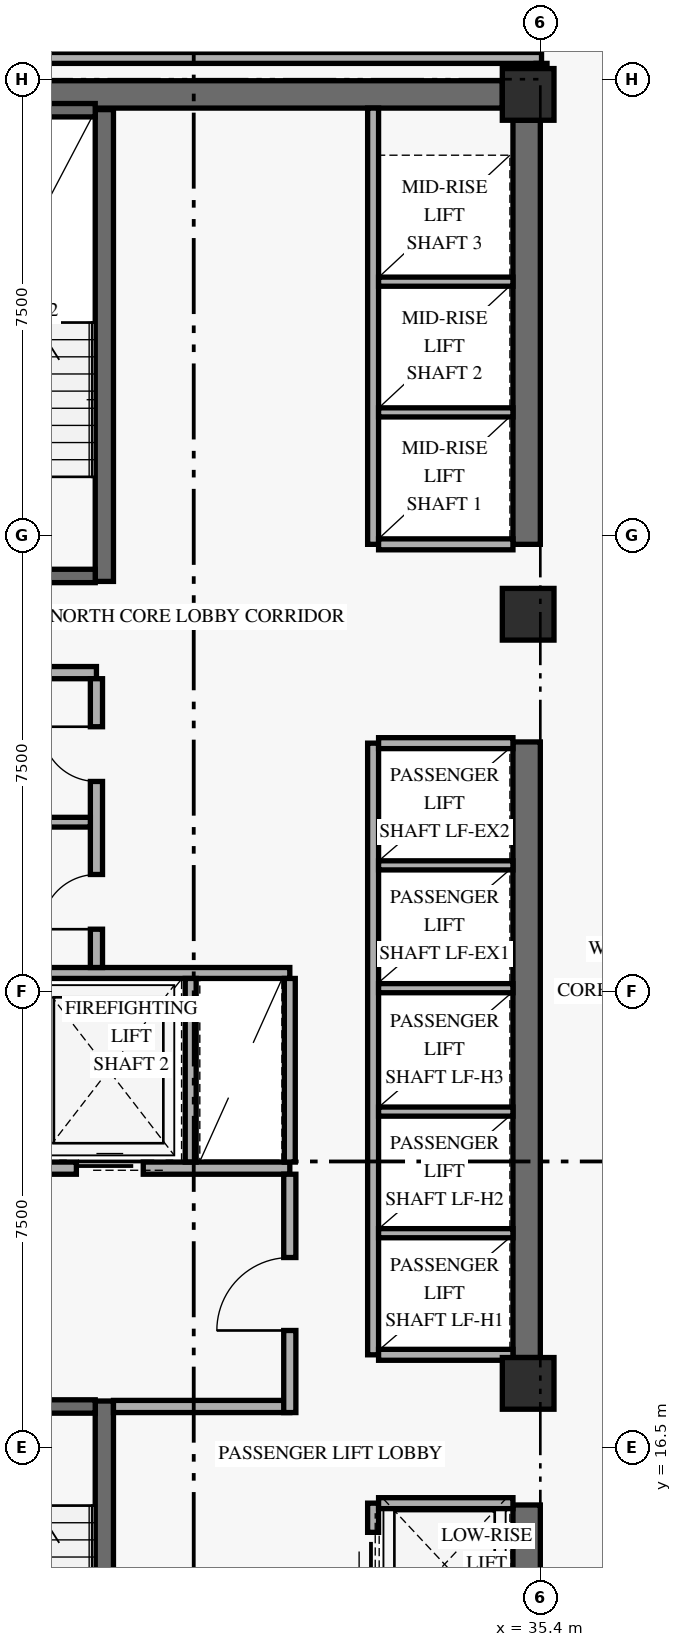
"""IFC4 building model, lengths in metres.
Left out: names, types, materials, properties, quantities, classifications, styles, units other than length and angle.
Written with IfcOpenShell. Run it as: python <this file> out.ifc"""

import sys

from ifc_helpers import new_model, si_unit, direction, frame, frame_2d, origin, origin_2d, place, context, subcontext, project, spatial, rectangle, extrude, element, fill, save


model = new_model("IFC4")
c1 = context("Model", 3, precision=1e-05, world=origin(), true_north=direction((0.0, 1.0)))
c2 = subcontext(c1, "Body", "Model", "MODEL_VIEW")
j1 = project(units=[si_unit("LENGTHUNIT", "METRE"), si_unit("PLANEANGLEUNIT", "RADIAN")], contexts=[c1])
p1 = place(None, origin())
s1 = spatial("IfcSite", under=j1, at=p1, CompositionType="ELEMENT")
p2 = place(p1, origin())
s2 = spatial("IfcBuilding", under=s1, at=p2, CompositionType="ELEMENT")
p3 = place(p2, frame((0.0, 0.0, 87.6)))
s3 = spatial("IfcBuildingStorey", under=s2, at=p3, CompositionType="ELEMENT", Elevation=87.6)
p4 = place(p3, frame((35.175, 9.675, 0.0), z_axis=(0.0, 0.0, 1.0), x_axis=(0.0, 1.0, 0.0)))
e1 = element("IfcWall", 1, at=p4, inside=s3, PredefinedType="SHEAR", context=c2, shape_type="SweptSolid", body=[
    extrude(rectangle(XDim=5.875, YDim=0.45, at=frame_2d((2.938, 0.0))), origin(), (0.0, 0.0, 1.0), 2.749),
])
p5 = place(p3, frame((35.175, 17.975, 0.0), z_axis=(0.0, 0.0, 1.0), x_axis=(0.0, 1.0, 0.0)))
e2 = element("IfcWall", 2, at=p5, inside=s3, PredefinedType="SHEAR", context=c2, shape_type="SweptSolid", body=[
    extrude(rectangle(XDim=10.125, YDim=0.45, at=frame_2d((5.062, 0.0))), origin(), (0.0, 0.0, 1.0), 2.749),
])
p6 = place(p3, frame((35.175, 31.35, 0.0), z_axis=(0.0, 0.0, 1.0), x_axis=(0.0, 1.0, 0.0)))
e3 = element("IfcWall", 3, at=p6, inside=s3, PredefinedType="SHEAR", context=c2, shape_type="SweptSolid", body=[
    extrude(rectangle(XDim=6.975, YDim=0.45, at=frame_2d((3.487, 0.0))), origin(), (0.0, 0.0, 1.0), 2.749),
])
p7 = place(p3, frame((24.625, 38.75, 0.0), z_axis=(0.0, 0.0, 1.0), x_axis=(1.0, 0.0, 0.0)))
e4 = element("IfcWall", 4, at=p7, inside=s3, PredefinedType="SHEAR", context=c2, shape_type="SweptSolid", body=[
    extrude(rectangle(XDim=10.15, YDim=0.45, at=frame_2d((5.075, 0.0))), origin(), (0.0, 0.0, 1.0), 3.36),
])
p8 = place(p3, frame((28.23, 9.5, 0.0), z_axis=(0.0, 0.0, 1.0), x_axis=(0.0, 1.0, 0.0)))
e5 = element("IfcWall", 5, at=p8, inside=s3, PredefinedType="SHEAR", context=c2, shape_type="SweptSolid", body=[
    extrude(rectangle(XDim=7.76, YDim=0.3, at=frame_2d((3.88, 0.0))), origin(), (0.0, 0.0, 1.0), 3.36),
])
p9 = place(p3, frame((24.92, 17.17, 0.0), z_axis=(0.0, 0.0, 1.0), x_axis=(1.0, 0.0, 0.0)))
e6 = element("IfcWall", 6, at=p9, inside=s3, PredefinedType="SHEAR", context=c2, shape_type="SweptSolid", body=[
    extrude(rectangle(XDim=3.16, YDim=0.22, at=frame_2d((1.58, 0.0))), origin(), (0.0, 0.0, 1.0), 3.36),
])
p10 = place(p9, frame((0.78, 0.0, 0.0)))
e7 = element("IfcOpeningElement", 7, at=p10, cuts=e6, PredefinedType="OPENING", context=c2, shape_type="SweptSolid", body=[
    extrude(rectangle(XDim=1.05, YDim=2.15, at=frame_2d((0.525, 1.075))), frame((0.0, 0.12, 0.0), z_axis=(0.0, -1.0, 0.0), x_axis=(1.0, 0.0, 0.0)), (0.0, 0.0, 1.0), 0.24),
])
p11 = place(p3, frame((28.23, 30.74, 0.0), z_axis=(0.0, 0.0, 1.0), x_axis=(0.0, 1.0, 0.0)))
e8 = element("IfcWall", 8, at=p11, inside=s3, PredefinedType="SHEAR", context=c2, shape_type="SweptSolid", body=[
    extrude(rectangle(XDim=7.76, YDim=0.3, at=frame_2d((3.88, 0.0))), origin(), (0.0, 0.0, 1.0), 3.36),
])
p12 = place(p3, frame((24.92, 30.83, 0.0), z_axis=(0.0, 0.0, 1.0), x_axis=(1.0, 0.0, 0.0)))
e9 = element("IfcWall", 9, at=p12, inside=s3, PredefinedType="SHEAR", context=c2, shape_type="SweptSolid", body=[
    extrude(rectangle(XDim=3.16, YDim=0.22, at=frame_2d((1.58, 0.0))), origin(), (0.0, 0.0, 1.0), 3.36),
])
p13 = place(p12, frame((0.78, 0.0, 0.0)))
e10 = element("IfcOpeningElement", 10, at=p13, cuts=e9, PredefinedType="OPENING", context=c2, shape_type="SweptSolid", body=[
    extrude(rectangle(XDim=1.05, YDim=2.15, at=frame_2d((0.525, 1.075))), frame((0.0, 0.12, 0.0), z_axis=(0.0, -1.0, 0.0), x_axis=(1.0, 0.0, 0.0)), (0.0, 0.0, 1.0), 0.24),
])
p14 = place(p3, frame((24.92, 38.49, 0.0), z_axis=(0.0, 0.0, 1.0), x_axis=(1.0, 0.0, 0.0)))
e11 = element("IfcWall", 11, at=p14, inside=s3, PredefinedType="SHEAR", context=c2, shape_type="SweptSolid", body=[
    extrude(rectangle(XDim=3.16, YDim=0.22, at=frame_2d((1.58, 0.0))), origin(), (0.0, 0.0, 1.0), 3.36),
])
for number, where, z_axis, x_axis in (
    (12, (35.2, 17.55, 0.0), (0.0, 0.0, 1.0), (1.0, 0.0, 0.0)),
    (13, (35.2, 30.2, 0.0), (0.0, 0.0, 1.0), (1.0, 0.0, 0.0)),
    (14, (35.2, 38.75, 0.0), (0.0, 0.0, 1.0), (1.0, 0.0, 0.0)),
):
    element("IfcColumn", number, at=place(p3, frame(where, z_axis=z_axis, x_axis=x_axis)), inside=s3, PredefinedType="COLUMN", context=c2, shape_type="SweptSolid", body=[
        extrude(rectangle(XDim=0.85, YDim=0.85, at=origin_2d()), origin(), (0.0, 0.0, 1.0), 3.6),
    ])
p15 = place(p3, frame((24.45, 21.09, 0.0), z_axis=(0.0, 0.0, 1.0), x_axis=(1.0, 0.0, 0.0)))
e15 = element("IfcWall", 15, at=p15, inside=s3, PredefinedType="STANDARD", context=c2, shape_type="SweptSolid", body=[
    extrude(rectangle(XDim=6.83, YDim=0.2, at=frame_2d((3.415, 0.0))), origin(), (0.0, 0.0, 1.0), 3.36),
])
p16 = place(p15, frame((0.72, 0.0, 0.0)))
e16 = element("IfcOpeningElement", 16, at=p16, cuts=e15, PredefinedType="OPENING", context=c2, shape_type="SweptSolid", body=[
    extrude(rectangle(XDim=1.1, YDim=2.2, at=frame_2d((0.55, 1.1))), frame((0.0, 0.11, 0.0), z_axis=(0.0, -1.0, 0.0), x_axis=(1.0, 0.0, 0.0)), (0.0, 0.0, 1.0), 0.22),
])
p17 = place(p15, frame((3.32, 0.0, 0.0)))
e17 = element("IfcOpeningElement", 17, at=p17, cuts=e15, PredefinedType="OPENING", context=c2, shape_type="SweptSolid", body=[
    extrude(rectangle(XDim=1.1, YDim=2.2, at=frame_2d((0.55, 1.1))), frame((0.0, 0.11, 0.0), z_axis=(0.0, -1.0, 0.0), x_axis=(1.0, 0.0, 0.0)), (0.0, 0.0, 1.0), 0.22),
])
p18 = place(p3, frame((28.38, 17.17, 0.0), z_axis=(0.0, 0.0, 1.0), x_axis=(1.0, 0.0, 0.0)))
e18 = element("IfcWall", 18, at=p18, inside=s3, PredefinedType="STANDARD", context=c2, shape_type="SweptSolid", body=[
    extrude(rectangle(XDim=2.9, YDim=0.2, at=frame_2d((1.45, 0.0))), origin(), (0.0, 0.0, 1.0), 3.36),
])
p19 = place(p3, frame((31.28, 17.07, 0.0), z_axis=(0.0, 0.0, 1.0), x_axis=(0.0, 1.0, 0.0)))
e19 = element("IfcWall", 19, at=p19, inside=s3, PredefinedType="STANDARD", context=c2, shape_type="SweptSolid", body=[
    extrude(rectangle(XDim=3.92, YDim=0.2, at=frame_2d((1.96, 0.0))), origin(), (0.0, 0.0, 1.0), 2.731),
])
p20 = place(p19, frame((1.35, 0.0, 0.0)))
e20 = element("IfcOpeningElement", 20, at=p20, cuts=e19, PredefinedType="OPENING", context=c2, shape_type="SweptSolid", body=[
    extrude(rectangle(XDim=1.2, YDim=2.15, at=frame_2d((0.6, 1.075))), frame((0.0, 0.11, 0.0), z_axis=(0.0, -1.0, 0.0), x_axis=(1.0, 0.0, 0.0)), (0.0, 0.0, 1.0), 0.22),
])
p21 = place(p3, frame((24.45, 24.3, 0.0), z_axis=(0.0, 0.0, 1.0), x_axis=(1.0, 0.0, 0.0)))
e21 = element("IfcWall", 21, at=p21, inside=s3, PredefinedType="STANDARD", context=c2, shape_type="SweptSolid", body=[
    extrude(rectangle(XDim=6.83, YDim=0.18, at=frame_2d((3.415, 0.0))), origin(), (0.0, 0.0, 1.0), 3.36),
])
for number, where, z_axis, x_axis in (
    (22, (29.65, 21.19, 0.0), (0.0, 0.0, 1.0), (0.0, 1.0, 0.0)),
    (23, (31.28, 21.19, 0.0), (0.0, 0.0, 1.0), (0.0, 1.0, 0.0)),
):
    element("IfcWall", number, at=place(p3, frame(where, z_axis=z_axis, x_axis=x_axis)), inside=s3, PredefinedType="STANDARD", context=c2, shape_type="SweptSolid", body=[
        extrude(rectangle(XDim=3.02, YDim=0.18, at=frame_2d((1.51, 0.0))), origin(), (0.0, 0.0, 1.0), 3.36),
    ])
p22 = place(p3, frame((24.45, 29.24, 0.0), z_axis=(0.0, 0.0, 1.0), x_axis=(1.0, 0.0, 0.0)))
e24 = element("IfcWall", 24, at=p22, inside=s3, PredefinedType="STANDARD", context=c2, shape_type="SweptSolid", body=[
    extrude(rectangle(XDim=3.65, YDim=0.2, at=frame_2d((1.825, 0.0))), origin(), (0.0, 0.0, 1.0), 3.36),
])
p23 = place(p3, frame((28.1, 24.39, 0.0), z_axis=(0.0, 0.0, 1.0), x_axis=(0.0, 1.0, 0.0)))
e25 = element("IfcWall", 25, at=p23, inside=s3, PredefinedType="STANDARD", context=c2, shape_type="SweptSolid", body=[
    extrude(rectangle(XDim=4.75, YDim=0.2, at=frame_2d((2.375, 0.0))), origin(), (0.0, 0.0, 1.0), 3.36),
])
p24 = place(p23, frame((0.63, 0.0, 0.0)))
e26 = element("IfcOpeningElement", 26, at=p24, cuts=e25, PredefinedType="OPENING", context=c2, shape_type="SweptSolid", body=[
    extrude(rectangle(XDim=0.9, YDim=2.1, at=frame_2d((0.45, 1.05))), frame((0.0, 0.11, 0.0), z_axis=(0.0, -1.0, 0.0), x_axis=(1.0, 0.0, 0.0)), (0.0, 0.0, 1.0), 0.22),
])
p25 = place(p23, frame((3.06, 0.0, 0.0)))
e27 = element("IfcOpeningElement", 27, at=p25, cuts=e25, PredefinedType="OPENING", context=c2, shape_type="SweptSolid", body=[
    extrude(rectangle(XDim=0.9, YDim=2.1, at=frame_2d((0.45, 1.05))), frame((0.0, 0.11, 0.0), z_axis=(0.0, -1.0, 0.0), x_axis=(1.0, 0.0, 0.0)), (0.0, 0.0, 1.0), 0.22),
])
p26 = place(p3, frame((24.45, 26.78, 0.0), z_axis=(0.0, 0.0, 1.0), x_axis=(1.0, 0.0, 0.0)))
e28 = element("IfcWall", 28, at=p26, inside=s3, PredefinedType="PARTITIONING", context=c2, shape_type="SweptSolid", body=[
    extrude(rectangle(XDim=3.55, YDim=0.16, at=frame_2d((1.775, 0.0))), origin(), (0.0, 0.0, 1.0), 3.36),
])
p27 = place(p3, frame((32.65, 9.5, 0.0), z_axis=(0.0, 0.0, 1.0), x_axis=(0.0, 1.0, 0.0)))
e29 = element("IfcWall", 29, at=p27, inside=s3, PredefinedType="STANDARD", context=c2, shape_type="SweptSolid", body=[
    extrude(rectangle(XDim=6.08, YDim=0.18, at=frame_2d((3.04, 0.0))), origin(), (0.0, 0.0, 1.0), 3.36),
])
p28 = place(p27, frame((0.55, 0.0, 0.0)))
e30 = element("IfcOpeningElement", 30, at=p28, cuts=e29, PredefinedType="OPENING", context=c2, shape_type="SweptSolid", body=[
    extrude(rectangle(XDim=1.05, YDim=2.2, at=frame_2d((0.525, 1.1))), frame((0.0, 0.1, 0.0), z_axis=(0.0, -1.0, 0.0), x_axis=(1.0, 0.0, 0.0)), (0.0, 0.0, 1.0), 0.2),
])
p29 = place(p27, frame((2.55, 0.0, 0.0)))
e31 = element("IfcOpeningElement", 31, at=p29, cuts=e29, PredefinedType="OPENING", context=c2, shape_type="SweptSolid", body=[
    extrude(rectangle(XDim=1.05, YDim=2.2, at=frame_2d((0.525, 1.1))), frame((0.0, 0.1, 0.0), z_axis=(0.0, -1.0, 0.0), x_axis=(1.0, 0.0, 0.0)), (0.0, 0.0, 1.0), 0.2),
])
p30 = place(p27, frame((4.55, 0.0, 0.0)))
e32 = element("IfcOpeningElement", 32, at=p30, cuts=e29, PredefinedType="OPENING", context=c2, shape_type="SweptSolid", body=[
    extrude(rectangle(XDim=1.05, YDim=2.2, at=frame_2d((0.525, 1.1))), frame((0.0, 0.1, 0.0), z_axis=(0.0, -1.0, 0.0), x_axis=(1.0, 0.0, 0.0)), (0.0, 0.0, 1.0), 0.2),
])
p31 = place(p3, frame((32.74, 15.58, 0.0), z_axis=(0.0, 0.0, 1.0), x_axis=(1.0, 0.0, 0.0)))
e33 = element("IfcWall", 33, at=p31, inside=s3, PredefinedType="STANDARD", context=c2, shape_type="SweptSolid", body=[
    extrude(rectangle(XDim=2.21, YDim=0.18, at=frame_2d((1.105, 0.0))), origin(), (0.0, 0.0, 1.0), 3.36),
])
p32 = place(p3, frame((32.65, 18.02, 0.0), z_axis=(0.0, 0.0, 1.0), x_axis=(0.0, 1.0, 0.0)))
e34 = element("IfcWall", 34, at=p32, inside=s3, PredefinedType="STANDARD", context=c2, shape_type="SweptSolid", body=[
    extrude(rectangle(XDim=10.06, YDim=0.18, at=frame_2d((5.03, 0.0))), origin(), (0.0, 0.0, 1.0), 3.36),
])
for number, where, z_axis, x_axis in (
    (35, (32.74, 18.02, 0.0), (0.0, 0.0, 1.0), (1.0, 0.0, 0.0)),
    (36, (32.74, 28.08, 0.0), (0.0, 0.0, 1.0), (1.0, 0.0, 0.0)),
):
    element("IfcWall", number, at=place(p3, frame(where, z_axis=z_axis, x_axis=x_axis)), inside=s3, PredefinedType="STANDARD", context=c2, shape_type="SweptSolid", body=[
        extrude(rectangle(XDim=2.21, YDim=0.18, at=frame_2d((1.105, 0.0))), origin(), (0.0, 0.0, 1.0), 3.36),
    ])
for number, where, z_axis, x_axis in (
    (37, (32.74, 20.02, 0.0), (0.0, 0.0, 1.0), (1.0, 0.0, 0.0)),
    (38, (32.74, 22.02, 0.0), (0.0, 0.0, 1.0), (1.0, 0.0, 0.0)),
    (39, (32.74, 24.05, 0.0), (0.0, 0.0, 1.0), (1.0, 0.0, 0.0)),
    (40, (32.74, 26.07, 0.0), (0.0, 0.0, 1.0), (1.0, 0.0, 0.0)),
):
    element("IfcWall", number, at=place(p3, frame(where, z_axis=z_axis, x_axis=x_axis)), inside=s3, PredefinedType="STANDARD", context=c2, shape_type="SweptSolid", body=[
        extrude(rectangle(XDim=2.21, YDim=0.15, at=frame_2d((1.105, 0.0))), origin(), (0.0, 0.0, 1.0), 3.36),
    ])
p33 = place(p3, frame((32.65, 31.35, 0.0), z_axis=(0.0, 0.0, 1.0), x_axis=(0.0, 1.0, 0.0)))
e41 = element("IfcWall", 41, at=p33, inside=s3, PredefinedType="STANDARD", context=c2, shape_type="SweptSolid", body=[
    extrude(rectangle(XDim=7.175, YDim=0.18, at=frame_2d((3.587, 0.0))), origin(), (0.0, 0.0, 1.0), 3.36),
])
p34 = place(p3, frame((32.74, 31.35, 0.0), z_axis=(0.0, 0.0, 1.0), x_axis=(1.0, 0.0, 0.0)))
e42 = element("IfcWall", 42, at=p34, inside=s3, PredefinedType="STANDARD", context=c2, shape_type="SweptSolid", body=[
    extrude(rectangle(XDim=2.21, YDim=0.18, at=frame_2d((1.105, 0.0))), origin(), (0.0, 0.0, 1.0), 3.36),
])
for number, where, z_axis, x_axis in (
    (43, (32.74, 33.52, 0.0), (0.0, 0.0, 1.0), (1.0, 0.0, 0.0)),
    (44, (32.74, 35.67, 0.0), (0.0, 0.0, 1.0), (1.0, 0.0, 0.0)),
):
    element("IfcWall", number, at=place(p3, frame(where, z_axis=z_axis, x_axis=x_axis)), inside=s3, PredefinedType="STANDARD", context=c2, shape_type="SweptSolid", body=[
        extrude(rectangle(XDim=2.21, YDim=0.15, at=frame_2d((1.105, 0.0))), origin(), (0.0, 0.0, 1.0), 3.36),
    ])
p35 = place(p3, frame((23.75, 39.35, 0.0), z_axis=(0.0, 0.0, 1.0), x_axis=(1.0, 0.0, 0.0)))
e45 = element("IfcWall", 45, at=p35, inside=s3, PredefinedType="STANDARD", context=c2, shape_type="SweptSolid", body=[
    extrude(rectangle(XDim=11.67, YDim=0.18, at=frame_2d((5.835, 0.0))), origin(), (0.0, 0.0, 1.0), 2.731),
])
p36 = place(p3, frame((35.42, 38.75, 0.0), z_axis=(0.0, 0.0, 1.0), x_axis=(0.0, 1.0, 0.0)))
e46 = element("IfcWall", 46, at=p36, inside=s3, PredefinedType="STANDARD", context=c2, shape_type="SweptSolid", body=[
    extrude(rectangle(XDim=0.51, YDim=0.18, at=frame_2d((0.255, 0.0))), origin(), (0.0, 0.0, 1.0), 2.731),
])
p37 = place(p17, origin())
e47 = element("IfcDoor", 47, at=p37, inside=s3, OperationType="SLIDING_TO_LEFT", PredefinedType="DOOR", context=c2, shape_type="SweptSolid", body=[
    extrude(rectangle(XDim=1.1, YDim=2.2, at=frame_2d((0.55, 1.1))), frame((0.0, 0.025, 0.0), z_axis=(0.0, -1.0, 0.0), x_axis=(1.0, 0.0, 0.0)), (0.0, 0.0, 1.0), 0.05),
])
fill(e17, e47)
p38 = place(p20, origin())
e48 = element("IfcDoor", 48, at=p38, inside=s3, OperationType="SINGLE_SWING_LEFT", PredefinedType="DOOR", context=c2, shape_type="SweptSolid", body=[
    extrude(rectangle(XDim=1.2, YDim=2.15, at=frame_2d((0.6, 1.075))), frame((0.0, 0.025, 0.0), z_axis=(0.0, -1.0, 0.0), x_axis=(1.0, 0.0, 0.0)), (0.0, 0.0, 1.0), 0.05),
])
fill(e20, e48)
p39 = place(p24, origin())
e49 = element("IfcDoor", 49, at=p39, inside=s3, OperationType="SINGLE_SWING_LEFT", PredefinedType="DOOR", context=c2, shape_type="SweptSolid", body=[
    extrude(rectangle(XDim=0.9, YDim=2.1, at=frame_2d((0.45, 1.05))), frame((0.0, 0.025, 0.0), z_axis=(0.0, -1.0, 0.0), x_axis=(1.0, 0.0, 0.0)), (0.0, 0.0, 1.0), 0.05),
])
fill(e26, e49)
p40 = place(p25, origin())
e50 = element("IfcDoor", 50, at=p40, inside=s3, OperationType="SINGLE_SWING_RIGHT", PredefinedType="DOOR", context=c2, shape_type="SweptSolid", body=[
    extrude(rectangle(XDim=0.9, YDim=2.1, at=frame_2d((0.45, 1.05))), frame((0.0, 0.025, 0.0), z_axis=(0.0, -1.0, 0.0), x_axis=(1.0, 0.0, 0.0)), (0.0, 0.0, 1.0), 0.05),
])
fill(e27, e50)
p41 = place(p30, origin())
e51 = element("IfcDoor", 51, at=p41, inside=s3, OperationType="SLIDING_TO_LEFT", PredefinedType="DOOR", context=c2, shape_type="SweptSolid", body=[
    extrude(rectangle(XDim=1.05, YDim=2.2, at=frame_2d((0.525, 1.1))), frame((0.0, 0.025, 0.0), z_axis=(0.0, -1.0, 0.0), x_axis=(1.0, 0.0, 0.0)), (0.0, 0.0, 1.0), 0.05),
])
fill(e32, e51)
save(model, sys.argv[1])
